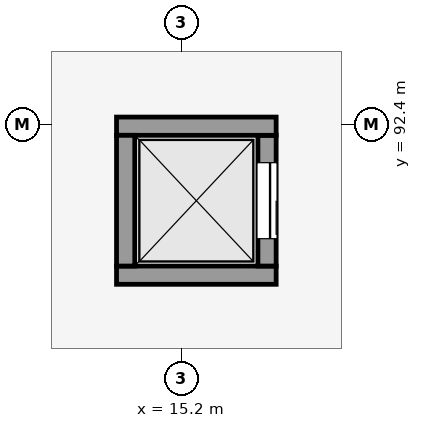
"""IFC4 building model, lengths in metres.
Left out: names, types, materials, properties, quantities, classifications, styles, units other than length and angle.
Written with IfcOpenShell. Run it as: python <this file> out.ifc"""

import sys

from ifc_helpers import new_model, si_unit, direction, frame, frame_2d, origin, place, context, subcontext, project, spatial, rectangle, extrude, element, fill, save


model = new_model("IFC4")
c1 = context("Model", 3, precision=1e-05, world=origin(), true_north=direction((0.0, 1.0)))
c2 = subcontext(c1, "Body", "Model", "MODEL_VIEW")
j1 = project(units=[si_unit("LENGTHUNIT", "METRE"), si_unit("PLANEANGLEUNIT", "RADIAN")], contexts=[c1])
p1 = place(None, origin())
s1 = spatial("IfcSite", under=j1, at=p1, CompositionType="ELEMENT")
p2 = place(p1, origin())
s2 = spatial("IfcBuilding", under=s1, at=p2, CompositionType="ELEMENT")
p3 = place(p2, frame((0.0, 0.0, 9.15)))
s3 = spatial("IfcBuildingStorey", under=s2, at=p3, CompositionType="ELEMENT", Elevation=9.15)
p4 = place(p3, frame((9.91, 96.222, 0.0), z_axis=(0.0, 0.0, 1.0), x_axis=(0.96792914822, -0.251223334956, 0.0)))
e1 = element("IfcWall", 1, at=p4, inside=s3, PredefinedType="SHEAR", context=c2, shape_type="SweptSolid", body=[
    extrude(rectangle(XDim=12.1, YDim=0.38, at=frame_2d((6.05, 0.0))), origin(), (0.0, 0.0, 1.0), 3.75),
])
p5 = place(p3, frame((16.45, 90.42, 0.0), z_axis=(0.0, 0.0, 1.0), x_axis=(-1.0, 0.0, 0.0)))
e2 = element("IfcWall", 2, at=p5, inside=s3, PredefinedType="SHEAR", context=c2, shape_type="SweptSolid", body=[
    extrude(rectangle(XDim=2.1, YDim=0.24, at=frame_2d((1.05, 0.0))), origin(), (0.0, 0.0, 1.0), 4.05),
])
p6 = place(p3, frame((16.33, 92.26, 0.0), z_axis=(0.0, 0.0, 1.0), x_axis=(0.0, -1.0, 0.0)))
e3 = element("IfcWall", 3, at=p6, inside=s3, PredefinedType="SHEAR", context=c2, shape_type="SweptSolid", body=[
    extrude(rectangle(XDim=1.72, YDim=0.24, at=frame_2d((0.86, 0.0))), origin(), (0.0, 0.0, 1.0), 4.05),
])
p7 = place(p6, frame((0.36, 0.0, 0.0)))
e4 = element("IfcOpeningElement", 4, at=p7, cuts=e3, PredefinedType="OPENING", context=c2, shape_type="SweptSolid", body=[
    extrude(rectangle(XDim=1.0, YDim=2.15, at=frame_2d((0.5, 1.075))), frame((0.0, 0.13, 0.0), z_axis=(0.0, -1.0, 0.0), x_axis=(1.0, 0.0, 0.0)), (0.0, 0.0, 1.0), 0.26),
])
p8 = place(p3, frame((14.35, 92.38, 0.0), z_axis=(0.0, 0.0, 1.0), x_axis=(1.0, 0.0, 0.0)))
e5 = element("IfcWall", 5, at=p8, inside=s3, PredefinedType="SHEAR", context=c2, shape_type="SweptSolid", body=[
    extrude(rectangle(XDim=2.1, YDim=0.24, at=frame_2d((1.05, 0.0))), origin(), (0.0, 0.0, 1.0), 4.05),
])
p9 = place(p3, frame((14.47, 90.54, 0.0), z_axis=(0.0, 0.0, 1.0), x_axis=(0.0, 1.0, 0.0)))
e6 = element("IfcWall", 6, at=p9, inside=s3, PredefinedType="SHEAR", context=c2, shape_type="SweptSolid", body=[
    extrude(rectangle(XDim=1.72, YDim=0.24, at=frame_2d((0.86, 0.0))), origin(), (0.0, 0.0, 1.0), 4.05),
])
p10 = place(p7, origin())
e7 = element("IfcDoor", 7, at=p10, inside=s3, OperationType="SLIDING_TO_RIGHT", PredefinedType="DOOR", context=c2, shape_type="SweptSolid", body=[
    extrude(rectangle(XDim=1.0, YDim=2.15, at=frame_2d((0.5, 1.075))), frame((0.0, 0.025, 0.0), z_axis=(0.0, -1.0, 0.0), x_axis=(1.0, 0.0, 0.0)), (0.0, 0.0, 1.0), 0.05),
])
fill(e4, e7)
save(model, sys.argv[1])
